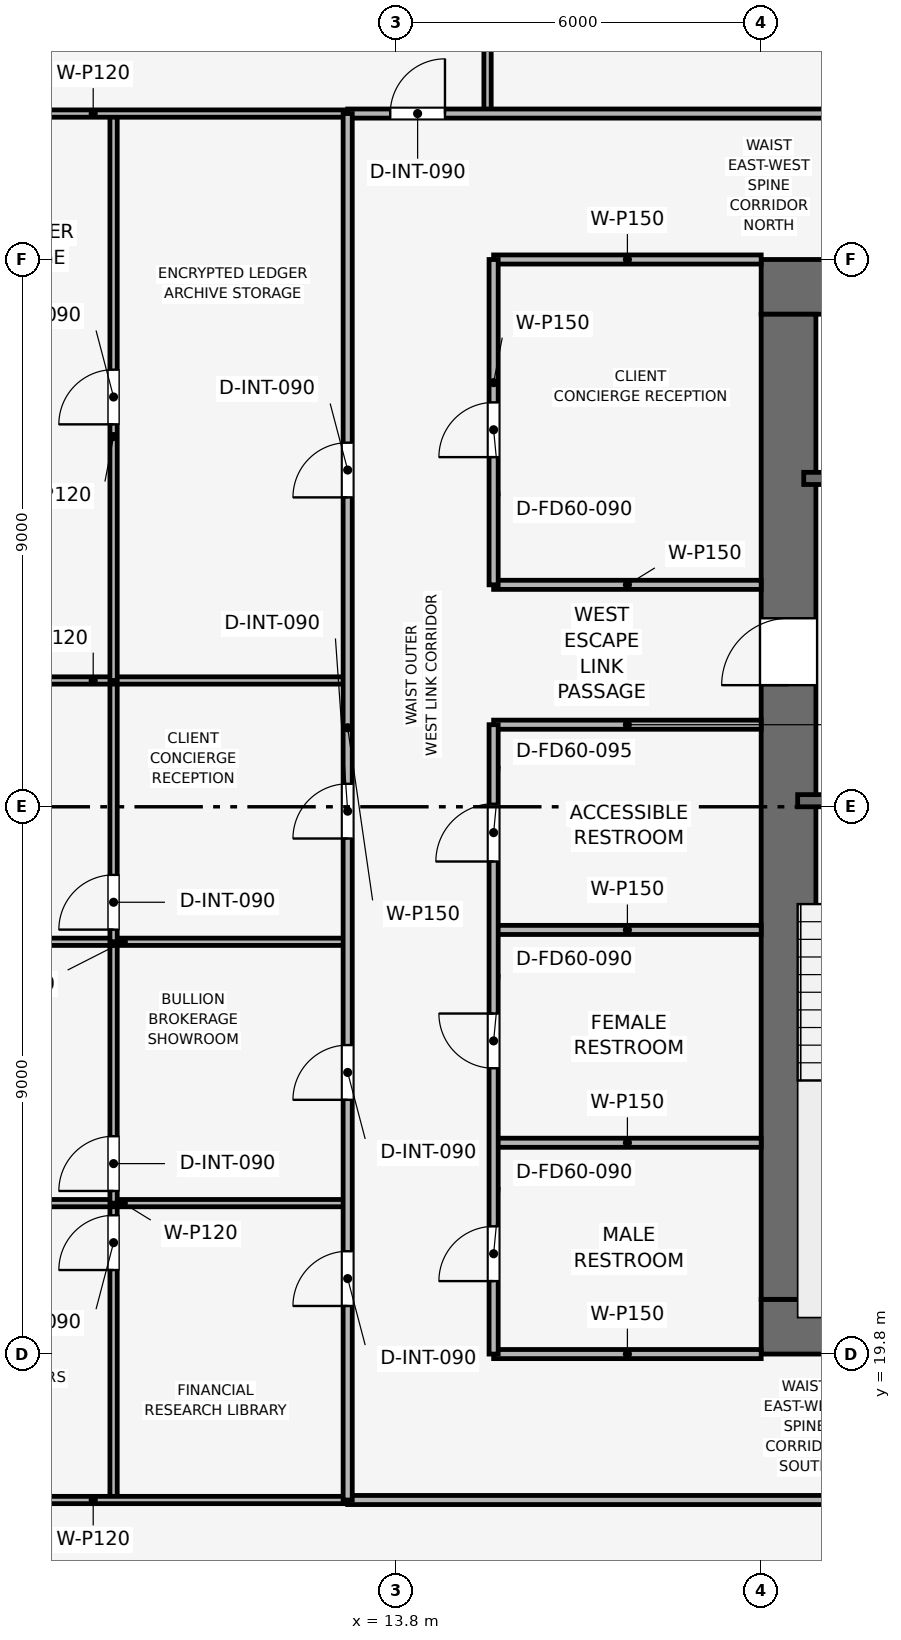
"""IFC4 building model, lengths in metres.
Left out: names, types, materials, properties, quantities, classifications, styles, units other than length and angle.
Written with IfcOpenShell. Run it as: python <this file> out.ifc"""

import sys

from ifc_helpers import new_model, si_unit, direction, frame, frame_2d, origin, place, context, subcontext, project, spatial, rectangle, extrude, element, fill, save


model = new_model("IFC4")
c1 = context("Model", 3, precision=1e-05, world=origin(), true_north=direction((0.0, 1.0)))
c2 = subcontext(c1, "Body", "Model", "MODEL_VIEW")
j1 = project(units=[si_unit("LENGTHUNIT", "METRE"), si_unit("PLANEANGLEUNIT", "RADIAN")], contexts=[c1])
p1 = place(None, origin())
s1 = spatial("IfcSite", under=j1, at=p1, CompositionType="ELEMENT")
p2 = place(p1, origin())
s2 = spatial("IfcBuilding", under=s1, at=p2, CompositionType="ELEMENT")
p3 = place(p2, frame((0.0, 0.0, 190.8)))
s3 = spatial("IfcBuildingStorey", under=s2, at=p3, CompositionType="ELEMENT", Elevation=190.8)
p4 = place(p3, frame((19.8, 20.25, 0.0), z_axis=(0.0, 0.0, 1.0), x_axis=(1.0, 0.0, 0.0)))
e1 = element("IfcWall", 1, at=p4, inside=s3, PredefinedType="SHEAR", context=c2, shape_type="SweptSolid", body=[
    extrude(rectangle(XDim=18.0, YDim=0.9, at=frame_2d((9.0, 0.0))), origin(), (0.0, 0.0, 1.0), 3.75),
])
p5 = place(p4, frame((8.4, 0.0, 0.0)))
e2 = element("IfcOpeningElement", 2, at=p5, cuts=e1, PredefinedType="OPENING", context=c2, shape_type="SweptSolid", body=[
    extrude(rectangle(XDim=1.2, YDim=2.2, at=frame_2d((0.6, 1.1))), frame((0.0, 0.46, 0.0), z_axis=(0.0, -1.0, 0.0), x_axis=(1.0, 0.0, 0.0)), (0.0, 0.0, 1.0), 0.92),
])
p6 = place(p3, frame((19.8, 37.35, 0.0), z_axis=(0.0, 0.0, 1.0), x_axis=(1.0, 0.0, 0.0)))
e3 = element("IfcWall", 3, at=p6, inside=s3, PredefinedType="SHEAR", context=c2, shape_type="SweptSolid", body=[
    extrude(rectangle(XDim=18.0, YDim=0.9, at=frame_2d((9.0, 0.0))), origin(), (0.0, 0.0, 1.0), 3.75),
])
p7 = place(p6, frame((7.05, 0.0, 0.0)))
e4 = element("IfcOpeningElement", 4, at=p7, cuts=e3, PredefinedType="OPENING", context=c2, shape_type="SweptSolid", body=[
    extrude(rectangle(XDim=1.1, YDim=2.15, at=frame_2d((0.55, 1.075))), frame((0.0, 0.46, 0.0), z_axis=(0.0, -1.0, 0.0), x_axis=(1.0, 0.0, 0.0)), (0.0, 0.0, 1.0), 0.92),
])
p8 = place(p3, frame((20.25, 20.7, 0.0), z_axis=(0.0, 0.0, 1.0), x_axis=(0.0, 1.0, 0.0)))
e5 = element("IfcWall", 5, at=p8, inside=s3, PredefinedType="SHEAR", context=c2, shape_type="SweptSolid", body=[
    extrude(rectangle(XDim=16.2, YDim=0.9, at=frame_2d((8.1, 0.0))), origin(), (0.0, 0.0, 1.0), 3.75),
])
p9 = place(p8, frame((10.1, 0.0, 0.0)))
e6 = element("IfcOpeningElement", 6, at=p9, cuts=e5, PredefinedType="OPENING", context=c2, shape_type="SweptSolid", body=[
    extrude(rectangle(XDim=1.1, YDim=2.15, at=frame_2d((0.55, 1.075))), frame((0.0, 0.46, 0.0), z_axis=(0.0, -1.0, 0.0), x_axis=(1.0, 0.0, 0.0)), (0.0, 0.0, 1.0), 0.92),
])
p10 = place(p3, frame((20.4, 28.9, 0.0), z_axis=(0.0, 0.0, 1.0), x_axis=(1.0, 0.0, 0.0)))
e7 = element("IfcWall", 7, at=p10, inside=s3, PredefinedType="SHEAR", context=c2, shape_type="SweptSolid", body=[
    extrude(rectangle(XDim=3.15, YDim=0.2, at=frame_2d((1.575, 0.0))), origin(), (0.0, 0.0, 1.0), 3.35),
])
p11 = place(p10, frame((0.8, 0.0, 0.0)))
e8 = element("IfcOpeningElement", 8, at=p11, cuts=e7, PredefinedType="OPENING", context=c2, shape_type="SweptSolid", body=[
    extrude(rectangle(XDim=1.0, YDim=2.1, at=frame_2d((0.5, 1.05))), frame((0.0, 0.11, 0.0), z_axis=(0.0, -1.0, 0.0), x_axis=(1.0, 0.0, 0.0)), (0.0, 0.0, 1.0), 0.22),
])
p12 = place(p3, frame((20.5, 34.2, 0.0), z_axis=(0.0, 0.0, 1.0), x_axis=(1.0, 0.0, 0.0)))
e9 = element("IfcWall", 9, at=p12, inside=s3, PredefinedType="SHEAR", context=c2, shape_type="SweptSolid", body=[
    extrude(rectangle(XDim=3.05, YDim=0.2, at=frame_2d((1.525, 0.0))), origin(), (0.0, 0.0, 1.0), 3.35),
])
p13 = place(p12, frame((0.75, 0.0, 0.0)))
e10 = element("IfcOpeningElement", 10, at=p13, cuts=e9, PredefinedType="OPENING", context=c2, shape_type="SweptSolid", body=[
    extrude(rectangle(XDim=1.1, YDim=2.15, at=frame_2d((0.55, 1.075))), frame((0.0, 0.11, 0.0), z_axis=(0.0, -1.0, 0.0), x_axis=(1.0, 0.0, 0.0)), (0.0, 0.0, 1.0), 0.22),
])
p14 = place(p3, frame((15.4, 19.8, 0.0), z_axis=(0.0, 0.0, 1.0), x_axis=(1.0, 0.0, 0.0)))
e11 = element("IfcWall", 11, at=p14, inside=s3, PredefinedType="PARTITIONING", context=c2, shape_type="SweptSolid", body=[
    extrude(rectangle(XDim=4.4, YDim=0.15, at=frame_2d((2.2, 0.0))), origin(), (0.0, 0.0, 1.0), 2.885),
])
for number, where, z_axis, x_axis in (
    (12, (15.4, 23.275, 0.0), (0.0, 0.0, 1.0), (1.0, 0.0, 0.0)),
    (13, (15.4, 26.775, 0.0), (0.0, 0.0, 1.0), (1.0, 0.0, 0.0)),
    (14, (15.4, 30.15, 0.0), (0.0, 0.0, 1.0), (1.0, 0.0, 0.0)),
    (15, (15.4, 32.45, 0.0), (0.0, 0.0, 1.0), (1.0, 0.0, 0.0)),
):
    element("IfcWall", number, at=place(p3, frame(where, z_axis=z_axis, x_axis=x_axis)), inside=s3, PredefinedType="PARTITIONING", context=c2, shape_type="SweptSolid", body=[
        extrude(rectangle(XDim=4.4, YDim=0.15, at=frame_2d((2.2, 0.0))), origin(), (0.0, 0.0, 1.0), 3.35),
    ])
p15 = place(p3, frame((15.4, 37.8, 0.0), z_axis=(0.0, 0.0, 1.0), x_axis=(1.0, 0.0, 0.0)))
e16 = element("IfcWall", 16, at=p15, inside=s3, PredefinedType="PARTITIONING", context=c2, shape_type="SweptSolid", body=[
    extrude(rectangle(XDim=4.4, YDim=0.15, at=frame_2d((2.2, 0.0))), origin(), (0.0, 0.0, 1.0), 2.885),
])
p16 = place(p3, frame((15.4, 19.8, 0.0), z_axis=(0.0, 0.0, 1.0), x_axis=(0.0, 1.0, 0.0)))
e17 = element("IfcWall", 17, at=p16, inside=s3, PredefinedType="PARTITIONING", context=c2, shape_type="SweptSolid", body=[
    extrude(rectangle(XDim=10.35, YDim=0.15, at=frame_2d((5.175, 0.0))), origin(), (0.0, 0.0, 1.0), 2.885),
])
p17 = place(p16, frame((1.2, 0.0, 0.0)))
e18 = element("IfcOpeningElement", 18, at=p17, cuts=e17, PredefinedType="OPENING", context=c2, shape_type="SweptSolid", body=[
    extrude(rectangle(XDim=0.9, YDim=2.1, at=frame_2d((0.45, 1.05))), frame((0.0, 0.085, 0.0), z_axis=(0.0, -1.0, 0.0), x_axis=(1.0, 0.0, 0.0)), (0.0, 0.0, 1.0), 0.17),
])
p18 = place(p16, frame((4.7, 0.0, 0.0)))
e19 = element("IfcOpeningElement", 19, at=p18, cuts=e17, PredefinedType="OPENING", context=c2, shape_type="SweptSolid", body=[
    extrude(rectangle(XDim=0.9, YDim=2.1, at=frame_2d((0.45, 1.05))), frame((0.0, 0.085, 0.0), z_axis=(0.0, -1.0, 0.0), x_axis=(1.0, 0.0, 0.0)), (0.0, 0.0, 1.0), 0.17),
])
p19 = place(p16, frame((8.1, 0.0, 0.0)))
e20 = element("IfcOpeningElement", 20, at=p19, cuts=e17, PredefinedType="OPENING", context=c2, shape_type="SweptSolid", body=[
    extrude(rectangle(XDim=0.95, YDim=2.1, at=frame_2d((0.475, 1.05))), frame((0.0, 0.085, 0.0), z_axis=(0.0, -1.0, 0.0), x_axis=(1.0, 0.0, 0.0)), (0.0, 0.0, 1.0), 0.17),
])
p20 = place(p3, frame((15.4, 32.45, 0.0), z_axis=(0.0, 0.0, 1.0), x_axis=(0.0, 1.0, 0.0)))
e21 = element("IfcWall", 21, at=p20, inside=s3, PredefinedType="PARTITIONING", context=c2, shape_type="SweptSolid", body=[
    extrude(rectangle(XDim=5.35, YDim=0.15, at=frame_2d((2.675, 0.0))), origin(), (0.0, 0.0, 1.0), 2.885),
])
p21 = place(p20, frame((2.1, 0.0, 0.0)))
e22 = element("IfcOpeningElement", 22, at=p21, cuts=e21, PredefinedType="OPENING", context=c2, shape_type="SweptSolid", body=[
    extrude(rectangle(XDim=0.9, YDim=2.1, at=frame_2d((0.45, 1.05))), frame((0.0, 0.085, 0.0), z_axis=(0.0, -1.0, 0.0), x_axis=(1.0, 0.0, 0.0)), (0.0, 0.0, 1.0), 0.17),
])
p22 = place(p3, frame((15.3, 40.2, 0.0), z_axis=(0.0, 0.0, 1.0), x_axis=(0.0, 1.0, 0.0)))
e23 = element("IfcWall", 23, at=p22, inside=s3, PredefinedType="PARTITIONING", context=c2, shape_type="SweptSolid", body=[
    extrude(rectangle(XDim=12.77, YDim=0.12, at=frame_2d((6.385, 0.0))), origin(), (0.0, 0.0, 1.0), 2.835),
])
p23 = place(p3, frame((9.15, 17.4, 0.0), z_axis=(0.0, 0.0, 1.0), x_axis=(0.0, 1.0, 0.0)))
e24 = element("IfcWall", 24, at=p23, inside=s3, PredefinedType="PARTITIONING", context=c2, shape_type="SweptSolid", body=[
    extrude(rectangle(XDim=4.882, YDim=0.12, at=frame_2d((2.441, 0.0))), origin(), (0.0, 0.0, 1.0), 2.885),
])
p24 = place(p23, frame((3.782, 0.0, 0.0)))
e25 = element("IfcOpeningElement", 25, at=p24, cuts=e24, PredefinedType="OPENING", context=c2, shape_type="SweptSolid", body=[
    extrude(rectangle(XDim=0.9, YDim=2.1, at=frame_2d((0.45, 1.05))), frame((0.0, 0.07, 0.0), z_axis=(0.0, -1.0, 0.0), x_axis=(1.0, 0.0, 0.0)), (0.0, 0.0, 1.0), 0.14),
])
p25 = place(p3, frame((4.63, 22.282, 0.0), z_axis=(0.0, 0.0, 1.0), x_axis=(1.0, 0.0, 0.0)))
e26 = element("IfcWall", 26, at=p25, inside=s3, PredefinedType="PARTITIONING", context=c2, shape_type="SweptSolid", body=[
    extrude(rectangle(XDim=8.37, YDim=0.12, at=frame_2d((4.185, 0.0))), origin(), (0.0, 0.0, 1.0), 2.835),
])
p26 = place(p3, frame((9.15, 22.282, 0.0), z_axis=(0.0, 0.0, 1.0), x_axis=(0.0, 1.0, 0.0)))
e27 = element("IfcWall", 27, at=p26, inside=s3, PredefinedType="PARTITIONING", context=c2, shape_type="SweptSolid", body=[
    extrude(rectangle(XDim=4.298, YDim=0.12, at=frame_2d((2.149, 0.0))), origin(), (0.0, 0.0, 1.0), 3.35),
])
p27 = place(p26, frame((0.2, 0.0, 0.0)))
e28 = element("IfcOpeningElement", 28, at=p27, cuts=e27, PredefinedType="OPENING", context=c2, shape_type="SweptSolid", body=[
    extrude(rectangle(XDim=0.9, YDim=2.1, at=frame_2d((0.45, 1.05))), frame((0.0, 0.07, 0.0), z_axis=(0.0, -1.0, 0.0), x_axis=(1.0, 0.0, 0.0)), (0.0, 0.0, 1.0), 0.14),
])
p28 = place(p3, frame((4.63, 26.58, 0.0), z_axis=(0.0, 0.0, 1.0), x_axis=(1.0, 0.0, 0.0)))
e29 = element("IfcWall", 29, at=p28, inside=s3, PredefinedType="PARTITIONING", context=c2, shape_type="SweptSolid", body=[
    extrude(rectangle(XDim=8.37, YDim=0.12, at=frame_2d((4.185, 0.0))), origin(), (0.0, 0.0, 1.0), 2.835),
])
p29 = place(p3, frame((9.15, 26.58, 0.0), z_axis=(0.0, 0.0, 1.0), x_axis=(0.0, 1.0, 0.0)))
e30 = element("IfcWall", 30, at=p29, inside=s3, PredefinedType="PARTITIONING", context=c2, shape_type="SweptSolid", body=[
    extrude(rectangle(XDim=4.297, YDim=0.12, at=frame_2d((2.148, 0.0))), origin(), (0.0, 0.0, 1.0), 2.885),
])
p30 = place(p29, frame((0.2, 0.0, 0.0)))
e31 = element("IfcOpeningElement", 31, at=p30, cuts=e30, PredefinedType="OPENING", context=c2, shape_type="SweptSolid", body=[
    extrude(rectangle(XDim=0.9, YDim=2.1, at=frame_2d((0.45, 1.05))), frame((0.0, 0.07, 0.0), z_axis=(0.0, -1.0, 0.0), x_axis=(1.0, 0.0, 0.0)), (0.0, 0.0, 1.0), 0.14),
])
p31 = place(p3, frame((4.63, 30.877, 0.0), z_axis=(0.0, 0.0, 1.0), x_axis=(1.0, 0.0, 0.0)))
e32 = element("IfcWall", 32, at=p31, inside=s3, PredefinedType="PARTITIONING", context=c2, shape_type="SweptSolid", body=[
    extrude(rectangle(XDim=8.37, YDim=0.12, at=frame_2d((4.185, 0.0))), origin(), (0.0, 0.0, 1.0), 2.835),
])
p32 = place(p3, frame((9.15, 30.877, 0.0), z_axis=(0.0, 0.0, 1.0), x_axis=(0.0, 1.0, 0.0)))
e33 = element("IfcWall", 33, at=p32, inside=s3, PredefinedType="PARTITIONING", context=c2, shape_type="SweptSolid", body=[
    extrude(rectangle(XDim=9.323, YDim=0.12, at=frame_2d((4.662, 0.0))), origin(), (0.0, 0.0, 1.0), 2.885),
])
p33 = place(p32, frame((4.212, 0.0, 0.0)))
e34 = element("IfcOpeningElement", 34, at=p33, cuts=e33, PredefinedType="OPENING", context=c2, shape_type="SweptSolid", body=[
    extrude(rectangle(XDim=0.9, YDim=2.1, at=frame_2d((0.45, 1.05))), frame((0.0, 0.07, 0.0), z_axis=(0.0, -1.0, 0.0), x_axis=(1.0, 0.0, 0.0)), (0.0, 0.0, 1.0), 0.14),
])
for number, where, z_axis, x_axis in (
    (35, (4.63, 17.4, 0.0), (0.0, 0.0, 1.0), (1.0, 0.0, 0.0)),
    (36, (4.63, 40.2, 0.0), (0.0, 0.0, 1.0), (1.0, 0.0, 0.0)),
):
    element("IfcWall", number, at=place(p3, frame(where, z_axis=z_axis, x_axis=x_axis)), inside=s3, PredefinedType="PARTITIONING", context=c2, shape_type="SweptSolid", body=[
        extrude(rectangle(XDim=8.37, YDim=0.12, at=frame_2d((4.185, 0.0))), origin(), (0.0, 0.0, 1.0), 2.835),
    ])
p34 = place(p3, frame((13.0, 17.4, 0.0), z_axis=(0.0, 0.0, 1.0), x_axis=(1.0, 0.0, 0.0)))
e37 = element("IfcWall", 37, at=p34, inside=s3, PredefinedType="PARTITIONING", context=c2, shape_type="SweptSolid", body=[
    extrude(rectangle(XDim=31.6, YDim=0.15, at=frame_2d((15.8, 0.0))), origin(), (0.0, 0.0, 1.0), 2.885),
])
p35 = place(p34, frame((15.35, 0.0, 0.0)))
e38 = element("IfcOpeningElement", 38, at=p35, cuts=e37, PredefinedType="OPENING", context=c2, shape_type="SweptSolid", body=[
    extrude(rectangle(XDim=0.9, YDim=2.1, at=frame_2d((0.45, 1.05))), frame((0.0, 0.085, 0.0), z_axis=(0.0, -1.0, 0.0), x_axis=(1.0, 0.0, 0.0)), (0.0, 0.0, 1.0), 0.17),
])
p36 = place(p3, frame((13.0, 40.2, 0.0), z_axis=(0.0, 0.0, 1.0), x_axis=(1.0, 0.0, 0.0)))
e39 = element("IfcWall", 39, at=p36, inside=s3, PredefinedType="PARTITIONING", context=c2, shape_type="SweptSolid", body=[
    extrude(rectangle(XDim=31.6, YDim=0.15, at=frame_2d((15.8, 0.0))), origin(), (0.0, 0.0, 1.0), 2.885),
])
p37 = place(p36, frame((0.7, 0.0, 0.0)))
e40 = element("IfcOpeningElement", 40, at=p37, cuts=e39, PredefinedType="OPENING", context=c2, shape_type="SweptSolid", body=[
    extrude(rectangle(XDim=0.9, YDim=2.1, at=frame_2d((0.45, 1.05))), frame((0.0, 0.085, 0.0), z_axis=(0.0, -1.0, 0.0), x_axis=(1.0, 0.0, 0.0)), (0.0, 0.0, 1.0), 0.17),
])
p38 = place(p36, frame((8.515, 0.0, 0.0)))
e41 = element("IfcOpeningElement", 41, at=p38, cuts=e39, PredefinedType="OPENING", context=c2, shape_type="SweptSolid", body=[
    extrude(rectangle(XDim=0.9, YDim=2.1, at=frame_2d((0.45, 1.05))), frame((0.0, 0.085, 0.0), z_axis=(0.0, -1.0, 0.0), x_axis=(1.0, 0.0, 0.0)), (0.0, 0.0, 1.0), 0.17),
])
p39 = place(p36, frame((23.165, 0.0, 0.0)))
e42 = element("IfcOpeningElement", 42, at=p39, cuts=e39, PredefinedType="OPENING", context=c2, shape_type="SweptSolid", body=[
    extrude(rectangle(XDim=0.9, YDim=2.1, at=frame_2d((0.45, 1.05))), frame((0.0, 0.085, 0.0), z_axis=(0.0, -1.0, 0.0), x_axis=(1.0, 0.0, 0.0)), (0.0, 0.0, 1.0), 0.17),
])
p40 = place(p3, frame((13.0, 17.4, 0.0), z_axis=(0.0, 0.0, 1.0), x_axis=(0.0, 1.0, 0.0)))
e43 = element("IfcWall", 43, at=p40, inside=s3, PredefinedType="PARTITIONING", context=c2, shape_type="SweptSolid", body=[
    extrude(rectangle(XDim=22.8, YDim=0.15, at=frame_2d((11.4, 0.0))), origin(), (0.0, 0.0, 1.0), 2.885),
])
p41 = place(p40, frame((3.191, 0.0, 0.0)))
e44 = element("IfcOpeningElement", 44, at=p41, cuts=e43, PredefinedType="OPENING", context=c2, shape_type="SweptSolid", body=[
    extrude(rectangle(XDim=0.9, YDim=2.1, at=frame_2d((0.45, 1.05))), frame((0.0, 0.085, 0.0), z_axis=(0.0, -1.0, 0.0), x_axis=(1.0, 0.0, 0.0)), (0.0, 0.0, 1.0), 0.17),
])
p42 = place(p40, frame((6.581, 0.0, 0.0)))
e45 = element("IfcOpeningElement", 45, at=p42, cuts=e43, PredefinedType="OPENING", context=c2, shape_type="SweptSolid", body=[
    extrude(rectangle(XDim=0.9, YDim=2.1, at=frame_2d((0.45, 1.05))), frame((0.0, 0.085, 0.0), z_axis=(0.0, -1.0, 0.0), x_axis=(1.0, 0.0, 0.0)), (0.0, 0.0, 1.0), 0.17),
])
p43 = place(p40, frame((10.878, 0.0, 0.0)))
e46 = element("IfcOpeningElement", 46, at=p43, cuts=e43, PredefinedType="OPENING", context=c2, shape_type="SweptSolid", body=[
    extrude(rectangle(XDim=0.9, YDim=2.1, at=frame_2d((0.45, 1.05))), frame((0.0, 0.085, 0.0), z_axis=(0.0, -1.0, 0.0), x_axis=(1.0, 0.0, 0.0)), (0.0, 0.0, 1.0), 0.17),
])
p44 = place(p40, frame((16.488, 0.0, 0.0)))
e47 = element("IfcOpeningElement", 47, at=p44, cuts=e43, PredefinedType="OPENING", context=c2, shape_type="SweptSolid", body=[
    extrude(rectangle(XDim=0.9, YDim=2.1, at=frame_2d((0.45, 1.05))), frame((0.0, 0.085, 0.0), z_axis=(0.0, -1.0, 0.0), x_axis=(1.0, 0.0, 0.0)), (0.0, 0.0, 1.0), 0.17),
])
p45 = place(p17, origin())
e48 = element("IfcDoor", 48, at=p45, inside=s3, OperationType="SINGLE_SWING_LEFT", PredefinedType="DOOR", context=c2, shape_type="SweptSolid", body=[
    extrude(rectangle(XDim=0.9, YDim=2.1, at=frame_2d((0.45, 1.05))), frame((0.0, 0.025, 0.0), z_axis=(0.0, -1.0, 0.0), x_axis=(1.0, 0.0, 0.0)), (0.0, 0.0, 1.0), 0.05),
])
fill(e18, e48)
p46 = place(p18, origin())
e49 = element("IfcDoor", 49, at=p46, inside=s3, OperationType="SINGLE_SWING_RIGHT", PredefinedType="DOOR", context=c2, shape_type="SweptSolid", body=[
    extrude(rectangle(XDim=0.9, YDim=2.1, at=frame_2d((0.45, 1.05))), frame((0.0, 0.025, 0.0), z_axis=(0.0, -1.0, 0.0), x_axis=(1.0, 0.0, 0.0)), (0.0, 0.0, 1.0), 0.05),
])
fill(e19, e49)
p47 = place(p19, origin())
e50 = element("IfcDoor", 50, at=p47, inside=s3, OperationType="SINGLE_SWING_LEFT", PredefinedType="DOOR", context=c2, shape_type="SweptSolid", body=[
    extrude(rectangle(XDim=0.95, YDim=2.1, at=frame_2d((0.475, 1.05))), frame((0.0, 0.025, 0.0), z_axis=(0.0, -1.0, 0.0), x_axis=(1.0, 0.0, 0.0)), (0.0, 0.0, 1.0), 0.05),
])
fill(e20, e50)
p48 = place(p21, origin())
e51 = element("IfcDoor", 51, at=p48, inside=s3, OperationType="SINGLE_SWING_LEFT", PredefinedType="DOOR", context=c2, shape_type="SweptSolid", body=[
    extrude(rectangle(XDim=0.9, YDim=2.1, at=frame_2d((0.45, 1.05))), frame((0.0, 0.025, 0.0), z_axis=(0.0, -1.0, 0.0), x_axis=(1.0, 0.0, 0.0)), (0.0, 0.0, 1.0), 0.05),
])
fill(e22, e51)
p49 = place(p24, origin())
e52 = element("IfcDoor", 52, at=p49, inside=s3, OperationType="SINGLE_SWING_LEFT", PredefinedType="DOOR", context=c2, shape_type="SweptSolid", body=[
    extrude(rectangle(XDim=0.9, YDim=2.1, at=frame_2d((0.45, 1.05))), frame((0.0, 0.025, 0.0), z_axis=(0.0, -1.0, 0.0), x_axis=(1.0, 0.0, 0.0)), (0.0, 0.0, 1.0), 0.05),
])
fill(e25, e52)
p50 = place(p27, origin())
e53 = element("IfcDoor", 53, at=p50, inside=s3, OperationType="SINGLE_SWING_LEFT", PredefinedType="DOOR", context=c2, shape_type="SweptSolid", body=[
    extrude(rectangle(XDim=0.9, YDim=2.1, at=frame_2d((0.45, 1.05))), frame((0.0, 0.025, 0.0), z_axis=(0.0, -1.0, 0.0), x_axis=(1.0, 0.0, 0.0)), (0.0, 0.0, 1.0), 0.05),
])
fill(e28, e53)
p51 = place(p30, origin())
e54 = element("IfcDoor", 54, at=p51, inside=s3, OperationType="SINGLE_SWING_LEFT", PredefinedType="DOOR", context=c2, shape_type="SweptSolid", body=[
    extrude(rectangle(XDim=0.9, YDim=2.1, at=frame_2d((0.45, 1.05))), frame((0.0, 0.025, 0.0), z_axis=(0.0, -1.0, 0.0), x_axis=(1.0, 0.0, 0.0)), (0.0, 0.0, 1.0), 0.05),
])
fill(e31, e54)
p52 = place(p33, origin())
e55 = element("IfcDoor", 55, at=p52, inside=s3, OperationType="SINGLE_SWING_LEFT", PredefinedType="DOOR", context=c2, shape_type="SweptSolid", body=[
    extrude(rectangle(XDim=0.9, YDim=2.1, at=frame_2d((0.45, 1.05))), frame((0.0, 0.025, 0.0), z_axis=(0.0, -1.0, 0.0), x_axis=(1.0, 0.0, 0.0)), (0.0, 0.0, 1.0), 0.05),
])
fill(e34, e55)
p53 = place(p37, origin())
e56 = element("IfcDoor", 56, at=p53, inside=s3, OperationType="SINGLE_SWING_RIGHT", PredefinedType="DOOR", context=c2, shape_type="SweptSolid", body=[
    extrude(rectangle(XDim=0.9, YDim=2.1, at=frame_2d((0.45, 1.05))), frame((0.0, 0.025, 0.0), z_axis=(0.0, -1.0, 0.0), x_axis=(1.0, 0.0, 0.0)), (0.0, 0.0, 1.0), 0.05),
])
fill(e40, e56)
p54 = place(p41, origin())
e57 = element("IfcDoor", 57, at=p54, inside=s3, OperationType="SINGLE_SWING_LEFT", PredefinedType="DOOR", context=c2, shape_type="SweptSolid", body=[
    extrude(rectangle(XDim=0.9, YDim=2.1, at=frame_2d((0.45, 1.05))), frame((0.0, 0.025, 0.0), z_axis=(0.0, -1.0, 0.0), x_axis=(1.0, 0.0, 0.0)), (0.0, 0.0, 1.0), 0.05),
])
fill(e44, e57)
p55 = place(p42, origin())
e58 = element("IfcDoor", 58, at=p55, inside=s3, OperationType="SINGLE_SWING_LEFT", PredefinedType="DOOR", context=c2, shape_type="SweptSolid", body=[
    extrude(rectangle(XDim=0.9, YDim=2.1, at=frame_2d((0.45, 1.05))), frame((0.0, 0.025, 0.0), z_axis=(0.0, -1.0, 0.0), x_axis=(1.0, 0.0, 0.0)), (0.0, 0.0, 1.0), 0.05),
])
fill(e45, e58)
p56 = place(p43, origin())
e59 = element("IfcDoor", 59, at=p56, inside=s3, OperationType="SINGLE_SWING_LEFT", PredefinedType="DOOR", context=c2, shape_type="SweptSolid", body=[
    extrude(rectangle(XDim=0.9, YDim=2.1, at=frame_2d((0.45, 1.05))), frame((0.0, 0.025, 0.0), z_axis=(0.0, -1.0, 0.0), x_axis=(1.0, 0.0, 0.0)), (0.0, 0.0, 1.0), 0.05),
])
fill(e46, e59)
p57 = place(p44, origin())
e60 = element("IfcDoor", 60, at=p57, inside=s3, OperationType="SINGLE_SWING_LEFT", PredefinedType="DOOR", context=c2, shape_type="SweptSolid", body=[
    extrude(rectangle(XDim=0.9, YDim=2.1, at=frame_2d((0.45, 1.05))), frame((0.0, 0.025, 0.0), z_axis=(0.0, -1.0, 0.0), x_axis=(1.0, 0.0, 0.0)), (0.0, 0.0, 1.0), 0.05),
])
fill(e47, e60)
p58 = place(p9, origin())
e61 = element("IfcDoor", 61, at=p58, inside=s3, OperationType="SINGLE_SWING_LEFT", PredefinedType="DOOR", context=c2, shape_type="SweptSolid", body=[
    extrude(rectangle(XDim=1.1, YDim=2.15, at=frame_2d((0.55, 1.075))), frame((0.0, 0.025, 0.0), z_axis=(0.0, -1.0, 0.0), x_axis=(1.0, 0.0, 0.0)), (0.0, 0.0, 1.0), 0.05),
])
fill(e6, e61)
save(model, sys.argv[1])
